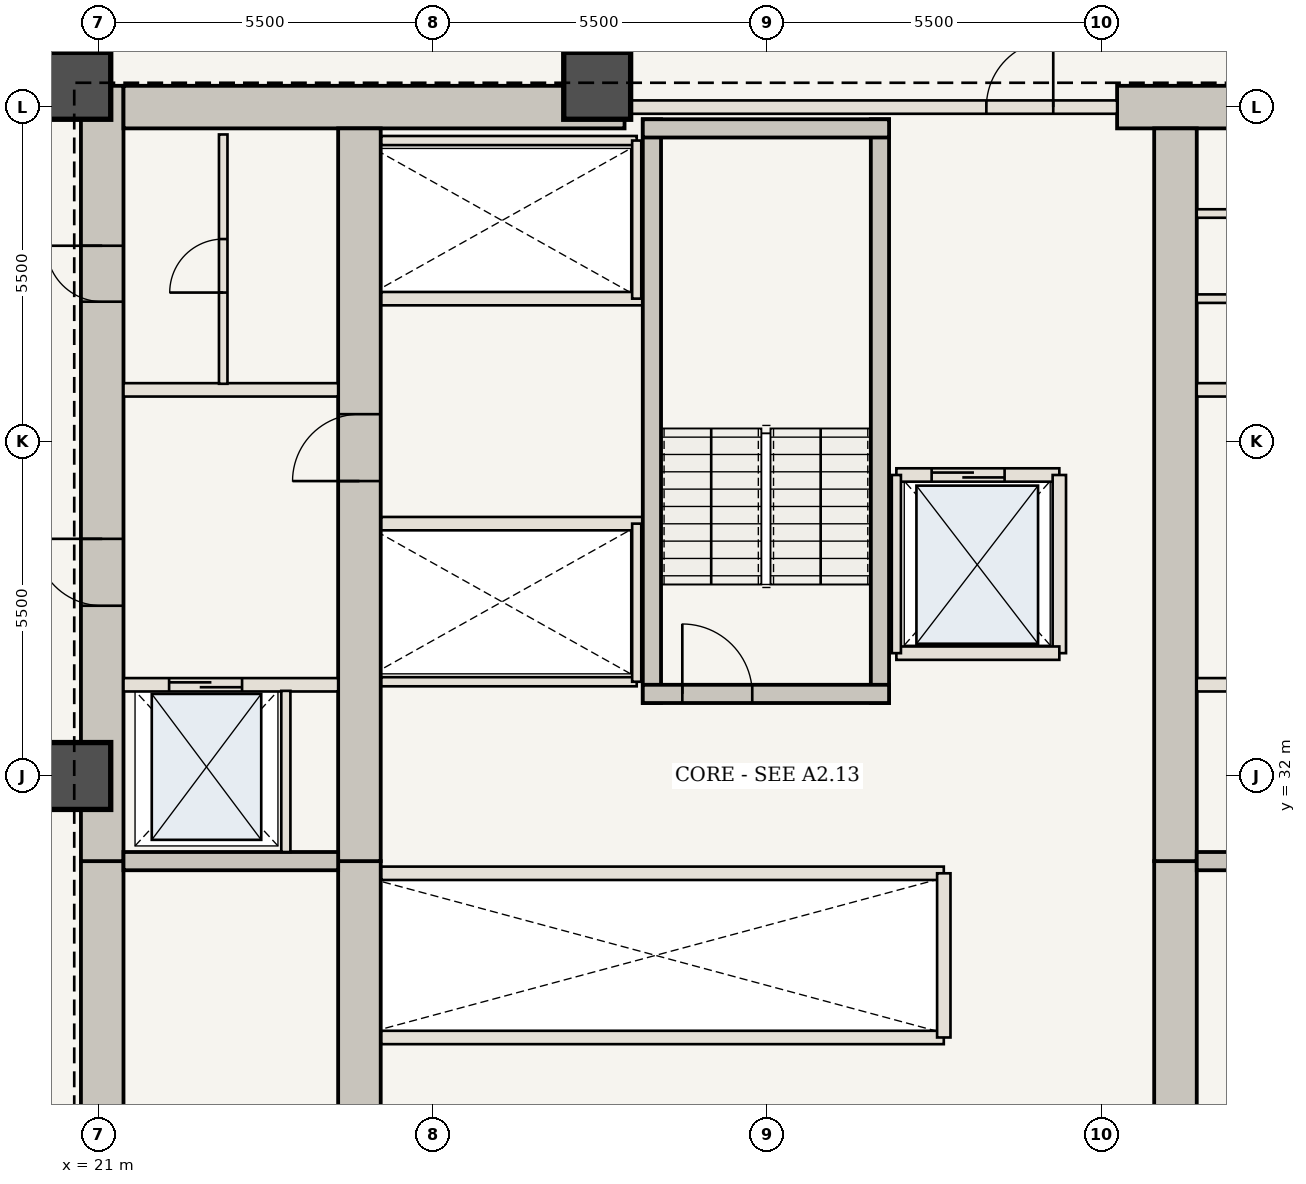
"""IFC4 building model, lengths in metres.
Left out: names, types, materials, properties, quantities, classifications, styles, units other than length and angle.
Written with IfcOpenShell. Run it as: python <this file> out.ifc"""

import sys

from ifc_helpers import new_model, si_unit, direction, frame, frame_2d, origin, origin_2d, place, context, subcontext, project, spatial, rectangle, extrude, element, fill, save


model = new_model("IFC4")
c1 = context("Model", 3, precision=1e-05, world=origin(), true_north=direction((0.0, 1.0)))
c2 = subcontext(c1, "Body", "Model", "MODEL_VIEW")
j1 = project(units=[si_unit("LENGTHUNIT", "METRE"), si_unit("PLANEANGLEUNIT", "RADIAN")], contexts=[c1])
p1 = place(None, origin())
s1 = spatial("IfcSite", under=j1, at=p1, CompositionType="ELEMENT")
p2 = place(p1, origin())
s2 = spatial("IfcBuilding", under=s1, at=p2, CompositionType="ELEMENT")
p3 = place(p2, frame((0.0, 0.0, 49.35)))
s3 = spatial("IfcBuildingStorey", under=s2, at=p3, CompositionType="ELEMENT", Elevation=49.35)
p4 = place(p3, frame((21.06, 20.6, 0.0), z_axis=(0.0, 0.0, 1.0), x_axis=(0.0, 1.0, 0.0)))
e1 = element("IfcWall", 1, at=p4, inside=s3, PredefinedType="SHEAR", context=c2, shape_type="SweptSolid", body=[
    extrude(rectangle(XDim=10.0, YDim=0.7, at=frame_2d((5.0, 0.0))), origin(), (0.0, 0.0, 1.0), 3.5),
])
p5 = place(p4, frame((1.15, 0.0, 0.0)))
e2 = element("IfcOpeningElement", 2, at=p5, cuts=e1, PredefinedType="OPENING", context=c2, shape_type="SweptSolid", body=[
    extrude(rectangle(XDim=1.15, YDim=2.15, at=frame_2d((0.575, 1.075))), frame((0.0, 0.36, 0.0), z_axis=(0.0, -1.0, 0.0), x_axis=(1.0, 0.0, 0.0)), (0.0, 0.0, 1.0), 0.72),
])
p6 = place(p3, frame((21.06, 30.6, 0.0), z_axis=(0.0, 0.0, 1.0), x_axis=(0.0, 1.0, 0.0)))
e3 = element("IfcWall", 3, at=p6, inside=s3, PredefinedType="SHEAR", context=c2, shape_type="SweptSolid", body=[
    extrude(rectangle(XDim=12.75, YDim=0.7, at=frame_2d((6.375, 0.0))), origin(), (0.0, 0.0, 1.0), 3.5),
])
p7 = place(p6, frame((4.2, 0.0, 0.0)))
e4 = element("IfcOpeningElement", 4, at=p7, cuts=e3, PredefinedType="OPENING", context=c2, shape_type="SweptSolid", body=[
    extrude(rectangle(XDim=1.1, YDim=2.15, at=frame_2d((0.55, 1.075))), frame((0.0, 0.36, 0.0), z_axis=(0.0, -1.0, 0.0), x_axis=(1.0, 0.0, 0.0)), (0.0, 0.0, 1.0), 0.72),
])
p8 = place(p6, frame((9.2, 0.0, 0.0)))
e5 = element("IfcOpeningElement", 5, at=p8, cuts=e3, PredefinedType="OPENING", context=c2, shape_type="SweptSolid", body=[
    extrude(rectangle(XDim=0.92, YDim=2.1, at=frame_2d((0.46, 1.05))), frame((0.0, 0.36, 0.0), z_axis=(0.0, -1.0, 0.0), x_axis=(1.0, 0.0, 0.0)), (0.0, 0.0, 1.0), 0.72),
])
p9 = place(p3, frame((21.41, 43.0, 0.0), z_axis=(0.0, 0.0, 1.0), x_axis=(1.0, 0.0, 0.0)))
e6 = element("IfcWall", 6, at=p9, inside=s3, PredefinedType="SHEAR", context=c2, shape_type="SweptSolid", body=[
    extrude(rectangle(XDim=8.24, YDim=0.7, at=frame_2d((4.12, 0.0))), origin(), (0.0, 0.0, 1.0), 3.5),
])
p10 = place(p3, frame((37.75, 43.0, 0.0), z_axis=(0.0, 0.0, 1.0), x_axis=(1.0, 0.0, 0.0)))
e7 = element("IfcWall", 7, at=p10, inside=s3, PredefinedType="SHEAR", context=c2, shape_type="SweptSolid", body=[
    extrude(rectangle(XDim=4.84, YDim=0.7, at=frame_2d((2.42, 0.0))), origin(), (0.0, 0.0, 1.0), 3.5),
])
p11 = place(p3, frame((25.29, 21.3, 0.0), z_axis=(0.0, 0.0, 1.0), x_axis=(0.0, 1.0, 0.0)))
e8 = element("IfcWall", 8, at=p11, inside=s3, PredefinedType="SHEAR", context=c2, shape_type="SweptSolid", body=[
    extrude(rectangle(XDim=9.3, YDim=0.7, at=frame_2d((4.65, 0.0))), origin(), (0.0, 0.0, 1.0), 3.5),
])
p12 = place(p3, frame((25.29, 30.6, 0.0), z_axis=(0.0, 0.0, 1.0), x_axis=(0.0, 1.0, 0.0)))
e9 = element("IfcWall", 9, at=p12, inside=s3, PredefinedType="SHEAR", context=c2, shape_type="SweptSolid", body=[
    extrude(rectangle(XDim=12.05, YDim=0.7, at=frame_2d((6.025, 0.0))), origin(), (0.0, 0.0, 1.0), 3.5),
])
p13 = place(p12, frame((6.25, 0.0, 0.0)))
e10 = element("IfcOpeningElement", 10, at=p13, cuts=e9, PredefinedType="OPENING", context=c2, shape_type="SweptSolid", body=[
    extrude(rectangle(XDim=1.1, YDim=2.15, at=frame_2d((0.55, 1.075))), frame((0.0, 0.36, 0.0), z_axis=(0.0, -1.0, 0.0), x_axis=(1.0, 0.0, 0.0)), (0.0, 0.0, 1.0), 0.72),
])
p14 = place(p3, frame((38.71, 21.3, 0.0), z_axis=(0.0, 0.0, 1.0), x_axis=(0.0, 1.0, 0.0)))
e11 = element("IfcWall", 11, at=p14, inside=s3, PredefinedType="SHEAR", context=c2, shape_type="SweptSolid", body=[
    extrude(rectangle(XDim=9.3, YDim=0.7, at=frame_2d((4.65, 0.0))), origin(), (0.0, 0.0, 1.0), 3.5),
])
p15 = place(p3, frame((38.71, 30.6, 0.0), z_axis=(0.0, 0.0, 1.0), x_axis=(0.0, 1.0, 0.0)))
e12 = element("IfcWall", 12, at=p15, inside=s3, PredefinedType="SHEAR", context=c2, shape_type="SweptSolid", body=[
    extrude(rectangle(XDim=12.05, YDim=0.7, at=frame_2d((6.025, 0.0))), origin(), (0.0, 0.0, 1.0), 3.5),
])
for number, where, z_axis, x_axis in (
    (13, (29.2, 43.35, 0.0), (0.0, 0.0, 1.0), (1.0, 0.0, 0.0)),
    (14, (20.65, 43.35, 0.0), (0.0, 0.0, 1.0), (1.0, 0.0, 0.0)),
    (15, (20.65, 32.0, 0.0), (0.0, 0.0, 1.0), (1.0, 0.0, 0.0)),
):
    element("IfcColumn", number, at=place(p3, frame(where, z_axis=z_axis, x_axis=x_axis)), inside=s3, PredefinedType="COLUMN", context=c2, shape_type="SweptSolid", body=[
        extrude(rectangle(XDim=1.1, YDim=1.1, at=origin_2d()), origin(), (0.0, 0.0, 1.0), 3.5),
    ])
for number, where, z_axis, x_axis in (
    (16, (21.41, 30.6, 0.0), (0.0, 0.0, 1.0), (1.0, 0.0, 0.0)),
    (17, (39.06, 30.6, 0.0), (0.0, 0.0, 1.0), (1.0, 0.0, 0.0)),
):
    element("IfcWall", number, at=place(p3, frame(where, z_axis=z_axis, x_axis=x_axis)), inside=s3, PredefinedType="SHEAR", context=c2, shape_type="SweptSolid", body=[
        extrude(rectangle(XDim=3.53, YDim=0.3, at=frame_2d((1.765, 0.0))), origin(), (0.0, 0.0, 1.0), 3.32),
    ])
p16 = place(p3, frame((21.41, 33.5, 0.0), z_axis=(0.0, 0.0, 1.0), x_axis=(1.0, 0.0, 0.0)))
e18 = element("IfcWall", 18, at=p16, inside=s3, PredefinedType="STANDARD", context=c2, shape_type="SweptSolid", body=[
    extrude(rectangle(XDim=3.53, YDim=0.22, at=frame_2d((1.765, 0.0))), origin(), (0.0, 0.0, 1.0), 3.32),
])
p17 = place(p16, frame((0.75, 0.0, 0.0)))
e19 = element("IfcOpeningElement", 19, at=p17, cuts=e18, PredefinedType="OPENING", context=c2, shape_type="SweptSolid", body=[
    extrude(rectangle(XDim=1.2, YDim=2.2, at=frame_2d((0.6, 1.1))), frame((0.0, 0.12, 0.0), z_axis=(0.0, -1.0, 0.0), x_axis=(1.0, 0.0, 0.0)), (0.0, 0.0, 1.0), 0.24),
])
p18 = place(p3, frame((24.08, 30.75, 0.0), z_axis=(0.0, 0.0, 1.0), x_axis=(0.0, 1.0, 0.0)))
e20 = element("IfcWall", 20, at=p18, inside=s3, PredefinedType="STANDARD", context=c2, shape_type="SweptSolid", body=[
    extrude(rectangle(XDim=2.65, YDim=0.15, at=frame_2d((1.325, 0.0))), origin(), (0.0, 0.0, 1.0), 3.32),
])
p19 = place(p3, frame((39.06, 33.5, 0.0), z_axis=(0.0, 0.0, 1.0), x_axis=(1.0, 0.0, 0.0)))
e21 = element("IfcWall", 21, at=p19, inside=s3, PredefinedType="STANDARD", context=c2, shape_type="SweptSolid", body=[
    extrude(rectangle(XDim=3.53, YDim=0.22, at=frame_2d((1.765, 0.0))), origin(), (0.0, 0.0, 1.0), 3.32),
])
p20 = place(p19, frame((1.55, 0.0, 0.0)))
e22 = element("IfcOpeningElement", 22, at=p20, cuts=e21, PredefinedType="OPENING", context=c2, shape_type="SweptSolid", body=[
    extrude(rectangle(XDim=1.2, YDim=2.2, at=frame_2d((0.6, 1.1))), frame((0.0, 0.12, 0.0), z_axis=(0.0, -1.0, 0.0), x_axis=(1.0, 0.0, 0.0)), (0.0, 0.0, 1.0), 0.24),
])
for number, where, z_axis, x_axis in (
    (23, (21.41, 38.35, 0.0), (0.0, 0.0, 1.0), (1.0, 0.0, 0.0)),
    (24, (39.06, 38.35, 0.0), (0.0, 0.0, 1.0), (1.0, 0.0, 0.0)),
):
    element("IfcWall", number, at=place(p3, frame(where, z_axis=z_axis, x_axis=x_axis)), inside=s3, PredefinedType="STANDARD", context=c2, shape_type="SweptSolid", body=[
        extrude(rectangle(XDim=3.53, YDim=0.22, at=frame_2d((1.765, 0.0))), origin(), (0.0, 0.0, 1.0), 3.32),
    ])
p21 = place(p3, frame((23.05, 38.45, 0.0), z_axis=(0.0, 0.0, 1.0), x_axis=(0.0, 1.0, 0.0)))
e25 = element("IfcWall", 25, at=p21, inside=s3, PredefinedType="STANDARD", context=c2, shape_type="SweptSolid", body=[
    extrude(rectangle(XDim=4.1, YDim=0.14, at=frame_2d((2.05, 0.0))), origin(), (0.0, 0.0, 1.0), 3.32),
])
p22 = place(p21, frame((1.5, 0.0, 0.0)))
e26 = element("IfcOpeningElement", 26, at=p22, cuts=e25, PredefinedType="OPENING", context=c2, shape_type="SweptSolid", body=[
    extrude(rectangle(XDim=0.88, YDim=2.1, at=frame_2d((0.44, 1.05))), frame((0.0, 0.08, 0.0), z_axis=(0.0, -1.0, 0.0), x_axis=(1.0, 0.0, 0.0)), (0.0, 0.0, 1.0), 0.16),
])
for number, where, z_axis, x_axis in (
    (27, (39.06, 39.85, 0.0), (0.0, 0.0, 1.0), (1.0, 0.0, 0.0)),
    (28, (39.06, 41.25, 0.0), (0.0, 0.0, 1.0), (1.0, 0.0, 0.0)),
):
    element("IfcWall", number, at=place(p3, frame(where, z_axis=z_axis, x_axis=x_axis)), inside=s3, PredefinedType="STANDARD", context=c2, shape_type="SweptSolid", body=[
        extrude(rectangle(XDim=3.53, YDim=0.14, at=frame_2d((1.765, 0.0))), origin(), (0.0, 0.0, 1.0), 3.32),
    ])
for number, where, z_axis, x_axis in (
    (29, (25.65, 27.7, 0.0), (0.0, 0.0, 1.0), (1.0, 0.0, 0.0)),
    (30, (25.65, 30.4, 0.0), (0.0, 0.0, 1.0), (1.0, 0.0, 0.0)),
):
    element("IfcWall", number, at=place(p3, frame(where, z_axis=z_axis, x_axis=x_axis)), inside=s3, PredefinedType="STANDARD", context=c2, shape_type="SweptSolid", body=[
        extrude(rectangle(XDim=9.25, YDim=0.22, at=frame_2d((4.625, 0.0))), origin(), (0.0, 0.0, 1.0), 3.32),
    ])
p23 = place(p3, frame((34.9, 27.7, 0.0), z_axis=(0.0, 0.0, 1.0), x_axis=(0.0, 1.0, 0.0)))
e31 = element("IfcWall", 31, at=p23, inside=s3, PredefinedType="STANDARD", context=c2, shape_type="SweptSolid", body=[
    extrude(rectangle(XDim=2.7, YDim=0.22, at=frame_2d((1.35, 0.0))), origin(), (0.0, 0.0, 1.0), 3.32),
])
p24 = place(p3, frame((25.65, 36.15, 0.0), z_axis=(0.0, 0.0, 1.0), x_axis=(1.0, 0.0, 0.0)))
e32 = element("IfcWall", 32, at=p24, inside=s3, PredefinedType="STANDARD", context=c2, shape_type="SweptSolid", body=[
    extrude(rectangle(XDim=4.3, YDim=0.22, at=frame_2d((2.15, 0.0))), origin(), (0.0, 0.0, 1.0), 3.32),
])
p25 = place(p3, frame((25.65, 33.55, 0.0), z_axis=(0.0, 0.0, 1.0), x_axis=(1.0, 0.0, 0.0)))
e33 = element("IfcWall", 33, at=p25, inside=s3, PredefinedType="STANDARD", context=c2, shape_type="SweptSolid", body=[
    extrude(rectangle(XDim=4.2, YDim=0.15, at=frame_2d((2.1, 0.0))), origin(), (0.0, 0.0, 1.0), 3.32),
])
p26 = place(p3, frame((29.85, 33.55, 0.0), z_axis=(0.0, 0.0, 1.0), x_axis=(0.0, 1.0, 0.0)))
e34 = element("IfcWall", 34, at=p26, inside=s3, PredefinedType="STANDARD", context=c2, shape_type="SweptSolid", body=[
    extrude(rectangle(XDim=2.6, YDim=0.15, at=frame_2d((1.3, 0.0))), origin(), (0.0, 0.0, 1.0), 3.32),
])
p27 = place(p3, frame((25.65, 39.85, 0.0), z_axis=(0.0, 0.0, 1.0), x_axis=(1.0, 0.0, 0.0)))
e35 = element("IfcWall", 35, at=p27, inside=s3, PredefinedType="STANDARD", context=c2, shape_type="SweptSolid", body=[
    extrude(rectangle(XDim=4.3, YDim=0.22, at=frame_2d((2.15, 0.0))), origin(), (0.0, 0.0, 1.0), 3.32),
])
p28 = place(p3, frame((25.65, 42.45, 0.0), z_axis=(0.0, 0.0, 1.0), x_axis=(1.0, 0.0, 0.0)))
e36 = element("IfcWall", 36, at=p28, inside=s3, PredefinedType="STANDARD", context=c2, shape_type="SweptSolid", body=[
    extrude(rectangle(XDim=4.2, YDim=0.15, at=frame_2d((2.1, 0.0))), origin(), (0.0, 0.0, 1.0), 3.32),
])
p29 = place(p3, frame((29.85, 39.85, 0.0), z_axis=(0.0, 0.0, 1.0), x_axis=(0.0, 1.0, 0.0)))
e37 = element("IfcWall", 37, at=p29, inside=s3, PredefinedType="STANDARD", context=c2, shape_type="SweptSolid", body=[
    extrude(rectangle(XDim=2.6, YDim=0.15, at=frame_2d((1.3, 0.0))), origin(), (0.0, 0.0, 1.0), 3.32),
])
for number, where, z_axis, x_axis in (
    (38, (30.1, 33.2, 0.0), (0.0, 0.0, 1.0), (0.0, 1.0, 0.0)),
    (39, (33.85, 33.2, 0.0), (0.0, 0.0, 1.0), (0.0, 1.0, 0.0)),
):
    element("IfcWall", number, at=place(p3, frame(where, z_axis=z_axis, x_axis=x_axis)), inside=s3, PredefinedType="SHEAR", context=c2, shape_type="SweptSolid", body=[
        extrude(rectangle(XDim=9.6, YDim=0.3, at=frame_2d((4.8, 0.0))), origin(), (0.0, 0.0, 1.0), 3.32),
    ])
p30 = place(p3, frame((29.95, 33.35, 0.0), z_axis=(0.0, 0.0, 1.0), x_axis=(1.0, 0.0, 0.0)))
e40 = element("IfcWall", 40, at=p30, inside=s3, PredefinedType="SHEAR", context=c2, shape_type="SweptSolid", body=[
    extrude(rectangle(XDim=4.05, YDim=0.3, at=frame_2d((2.025, 0.0))), origin(), (0.0, 0.0, 1.0), 3.32),
])
p31 = place(p30, frame((0.65, 0.0, 0.0)))
e41 = element("IfcOpeningElement", 41, at=p31, cuts=e40, PredefinedType="OPENING", context=c2, shape_type="SweptSolid", body=[
    extrude(rectangle(XDim=1.15, YDim=2.15, at=frame_2d((0.575, 1.075))), frame((0.0, 0.16, 0.0), z_axis=(0.0, -1.0, 0.0), x_axis=(1.0, 0.0, 0.0)), (0.0, 0.0, 1.0), 0.32),
])
p32 = place(p3, frame((29.95, 42.65, 0.0), z_axis=(0.0, 0.0, 1.0), x_axis=(1.0, 0.0, 0.0)))
e42 = element("IfcWall", 42, at=p32, inside=s3, PredefinedType="SHEAR", context=c2, shape_type="SweptSolid", body=[
    extrude(rectangle(XDim=4.05, YDim=0.3, at=frame_2d((2.025, 0.0))), origin(), (0.0, 0.0, 1.0), 3.32),
])
p33 = place(p3, frame((29.65, 43.0, 0.0), z_axis=(0.0, 0.0, 1.0), x_axis=(1.0, 0.0, 0.0)))
e43 = element("IfcWall", 43, at=p33, inside=s3, PredefinedType="STANDARD", context=c2, shape_type="SweptSolid", body=[
    extrude(rectangle(XDim=8.1, YDim=0.22, at=frame_2d((4.05, 0.0))), origin(), (0.0, 0.0, 1.0), 3.32),
])
p34 = place(p33, frame((5.95, 0.0, 0.0)))
e44 = element("IfcOpeningElement", 44, at=p34, cuts=e43, PredefinedType="OPENING", context=c2, shape_type="SweptSolid", body=[
    extrude(rectangle(XDim=1.1, YDim=2.15, at=frame_2d((0.55, 1.075))), frame((0.0, 0.12, 0.0), z_axis=(0.0, -1.0, 0.0), x_axis=(1.0, 0.0, 0.0)), (0.0, 0.0, 1.0), 0.24),
])
p35 = place(p3, frame((34.12, 36.95, 0.0), z_axis=(0.0, 0.0, 1.0), x_axis=(1.0, 0.0, 0.0)))
e45 = element("IfcWall", 45, at=p35, inside=s3, PredefinedType="STANDARD", context=c2, shape_type="SweptSolid", body=[
    extrude(rectangle(XDim=2.68, YDim=0.22, at=frame_2d((1.34, 0.0))), origin(), (0.0, 0.0, 1.0), 3.32),
])
p36 = place(p35, frame((0.58, 0.0, 0.0)))
e46 = element("IfcOpeningElement", 46, at=p36, cuts=e45, PredefinedType="OPENING", context=c2, shape_type="SweptSolid", body=[
    extrude(rectangle(XDim=1.2, YDim=2.2, at=frame_2d((0.6, 1.1))), frame((0.0, 0.12, 0.0), z_axis=(0.0, -1.0, 0.0), x_axis=(1.0, 0.0, 0.0)), (0.0, 0.0, 1.0), 0.24),
])
p37 = place(p3, frame((36.8, 34.02, 0.0), z_axis=(0.0, 0.0, 1.0), x_axis=(0.0, 1.0, 0.0)))
e47 = element("IfcWall", 47, at=p37, inside=s3, PredefinedType="STANDARD", context=c2, shape_type="SweptSolid", body=[
    extrude(rectangle(XDim=2.93, YDim=0.22, at=frame_2d((1.465, 0.0))), origin(), (0.0, 0.0, 1.0), 3.32),
])
p38 = place(p3, frame((34.12, 34.02, 0.0), z_axis=(0.0, 0.0, 1.0), x_axis=(1.0, 0.0, 0.0)))
e48 = element("IfcWall", 48, at=p38, inside=s3, PredefinedType="STANDARD", context=c2, shape_type="SweptSolid", body=[
    extrude(rectangle(XDim=2.68, YDim=0.22, at=frame_2d((1.34, 0.0))), origin(), (0.0, 0.0, 1.0), 3.32),
])
p39 = place(p3, frame((34.12, 34.02, 0.0), z_axis=(0.0, 0.0, 1.0), x_axis=(0.0, 1.0, 0.0)))
e49 = element("IfcWall", 49, at=p39, inside=s3, PredefinedType="STANDARD", context=c2, shape_type="SweptSolid", body=[
    extrude(rectangle(XDim=2.93, YDim=0.15, at=frame_2d((1.465, 0.0))), origin(), (0.0, 0.0, 1.0), 3.32),
])
p40 = place(p7, origin())
e50 = element("IfcDoor", 50, at=p40, inside=s3, OperationType="SINGLE_SWING_RIGHT", PredefinedType="DOOR", context=c2, shape_type="SweptSolid", body=[
    extrude(rectangle(XDim=1.1, YDim=2.15, at=frame_2d((0.55, 1.075))), frame((0.0, 0.025, 0.0), z_axis=(0.0, -1.0, 0.0), x_axis=(1.0, 0.0, 0.0)), (0.0, 0.0, 1.0), 0.05),
])
fill(e4, e50)
p41 = place(p13, origin())
e51 = element("IfcDoor", 51, at=p41, inside=s3, OperationType="SINGLE_SWING_LEFT", PredefinedType="DOOR", context=c2, shape_type="SweptSolid", body=[
    extrude(rectangle(XDim=1.1, YDim=2.15, at=frame_2d((0.55, 1.075))), frame((0.0, 0.025, 0.0), z_axis=(0.0, -1.0, 0.0), x_axis=(1.0, 0.0, 0.0)), (0.0, 0.0, 1.0), 0.05),
])
fill(e10, e51)
p42 = place(p8, origin())
e52 = element("IfcDoor", 52, at=p42, inside=s3, OperationType="SINGLE_SWING_RIGHT", PredefinedType="DOOR", context=c2, shape_type="SweptSolid", body=[
    extrude(rectangle(XDim=0.92, YDim=2.1, at=frame_2d((0.46, 1.05))), frame((0.0, 0.025, 0.0), z_axis=(0.0, -1.0, 0.0), x_axis=(1.0, 0.0, 0.0)), (0.0, 0.0, 1.0), 0.05),
])
fill(e5, e52)
p43 = place(p17, origin())
e53 = element("IfcDoor", 53, at=p43, inside=s3, OperationType="DOUBLE_DOOR_SLIDING", PredefinedType="DOOR", context=c2, shape_type="SweptSolid", body=[
    extrude(rectangle(XDim=1.2, YDim=2.2, at=frame_2d((0.6, 1.1))), frame((0.0, 0.025, 0.0), z_axis=(0.0, -1.0, 0.0), x_axis=(1.0, 0.0, 0.0)), (0.0, 0.0, 1.0), 0.05),
])
fill(e19, e53)
p44 = place(p22, origin())
e54 = element("IfcDoor", 54, at=p44, inside=s3, OperationType="SINGLE_SWING_LEFT", PredefinedType="DOOR", context=c2, shape_type="SweptSolid", body=[
    extrude(rectangle(XDim=0.88, YDim=2.1, at=frame_2d((0.44, 1.05))), frame((0.0, 0.025, 0.0), z_axis=(0.0, -1.0, 0.0), x_axis=(1.0, 0.0, 0.0)), (0.0, 0.0, 1.0), 0.05),
])
fill(e26, e54)
p45 = place(p31, origin())
e55 = element("IfcDoor", 55, at=p45, inside=s3, OperationType="SINGLE_SWING_LEFT", PredefinedType="DOOR", context=c2, shape_type="SweptSolid", body=[
    extrude(rectangle(XDim=1.15, YDim=2.15, at=frame_2d((0.575, 1.075))), frame((0.0, 0.025, 0.0), z_axis=(0.0, -1.0, 0.0), x_axis=(1.0, 0.0, 0.0)), (0.0, 0.0, 1.0), 0.05),
])
fill(e41, e55)
p46 = place(p34, origin())
e56 = element("IfcDoor", 56, at=p46, inside=s3, OperationType="SINGLE_SWING_RIGHT", PredefinedType="DOOR", context=c2, shape_type="SweptSolid", body=[
    extrude(rectangle(XDim=1.1, YDim=2.15, at=frame_2d((0.55, 1.075))), frame((0.0, 0.025, 0.0), z_axis=(0.0, -1.0, 0.0), x_axis=(1.0, 0.0, 0.0)), (0.0, 0.0, 1.0), 0.05),
])
fill(e44, e56)
p47 = place(p36, origin())
e57 = element("IfcDoor", 57, at=p47, inside=s3, OperationType="DOUBLE_DOOR_SLIDING", PredefinedType="DOOR", context=c2, shape_type="SweptSolid", body=[
    extrude(rectangle(XDim=1.2, YDim=2.2, at=frame_2d((0.6, 1.1))), frame((0.0, 0.025, 0.0), z_axis=(0.0, -1.0, 0.0), x_axis=(1.0, 0.0, 0.0)), (0.0, 0.0, 1.0), 0.05),
])
fill(e46, e57)
save(model, sys.argv[1])
